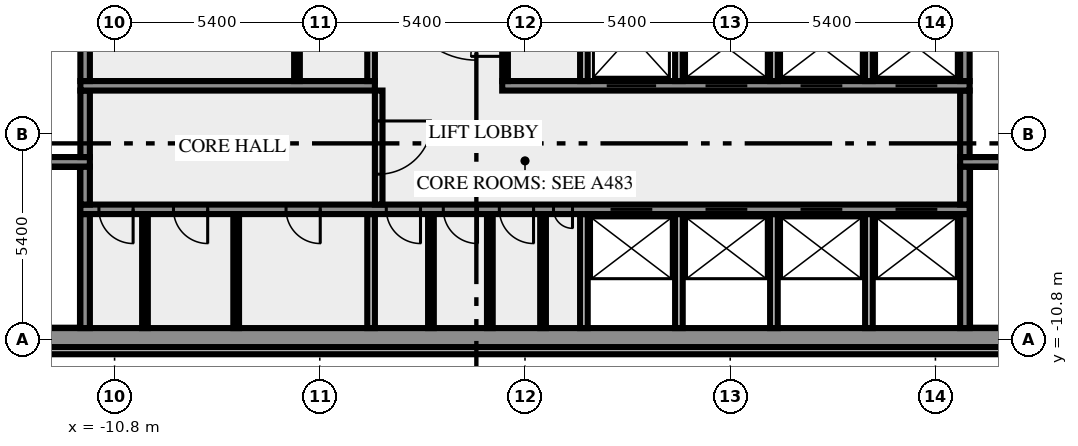
"""IFC4 building model, lengths in metres.
Left out: names, types, materials, properties, quantities, classifications, styles, units other than length and angle.
Written with IfcOpenShell. Run it as: python <this file> out.ifc"""

import sys

from ifc_helpers import new_model, si_unit, direction, frame, frame_2d, origin, place, context, subcontext, project, spatial, rectangle, extrude, element, fill, save


model = new_model("IFC4")
c1 = context("Model", 3, precision=1e-05, world=origin(), true_north=direction((0.0, 1.0)))
c2 = subcontext(c1, "Body", "Model", "MODEL_VIEW")
j1 = project(units=[si_unit("LENGTHUNIT", "METRE"), si_unit("PLANEANGLEUNIT", "RADIAN")], contexts=[c1])
p1 = place(None, origin())
s1 = spatial("IfcSite", under=j1, at=p1, CompositionType="ELEMENT")
p2 = place(p1, origin())
s2 = spatial("IfcBuilding", under=s1, at=p2, CompositionType="ELEMENT")
p3 = place(p2, frame((0.0, 0.0, 164.0)))
s3 = spatial("IfcBuildingStorey", under=s2, at=p3, CompositionType="ELEMENT", Elevation=164.0)
p4 = place(p3, frame((-17.444, -11.088, 0.0), z_axis=(0.0, 0.0, 1.0), x_axis=(1.0, 0.0, 0.0)))
e1 = element("IfcWall", 1, at=p4, inside=s3, PredefinedType="SOLIDWALL", context=c2, shape_type="SweptSolid", body=[
    extrude(rectangle(XDim=34.888, YDim=0.2, at=frame_2d((17.444, 0.0))), origin(), (0.0, 0.0, 1.0), 3.65),
])
p5 = place(p3, frame((-20.0, -10.75, 0.0), z_axis=(0.0, 0.0, 1.0), x_axis=(1.0, 0.0, 0.0)))
e2 = element("IfcWall", 2, at=p5, inside=s3, PredefinedType="SHEAR", context=c2, shape_type="SweptSolid", body=[
    extrude(rectangle(XDim=40.0, YDim=0.5, at=frame_2d((20.0, 0.0))), origin(), (0.0, 0.0, 1.0), 3.65),
])
p6 = place(p5, frame((0.8, 0.0, 1.0)))
e3 = element("IfcOpeningElement", 3, at=p6, cuts=e2, PredefinedType="OPENING", context=c2, shape_type="SweptSolid", body=[
    extrude(rectangle(XDim=1.2, YDim=1.2, at=frame_2d((0.6, 0.6))), frame((0.0, 0.26, 0.0), z_axis=(0.0, -1.0, 0.0), x_axis=(1.0, 0.0, 0.0)), (0.0, 0.0, 1.0), 0.52),
])
p7 = place(p5, frame((38.0, 0.0, 1.0)))
e4 = element("IfcOpeningElement", 4, at=p7, cuts=e2, PredefinedType="OPENING", context=c2, shape_type="SweptSolid", body=[
    extrude(rectangle(XDim=1.2, YDim=1.2, at=frame_2d((0.6, 0.6))), frame((0.0, 0.26, 0.0), z_axis=(0.0, -1.0, 0.0), x_axis=(1.0, 0.0, 0.0)), (0.0, 0.0, 1.0), 0.52),
])
p8 = place(p3, frame((-11.575, -10.5, 0.0), z_axis=(0.0, 0.0, 1.0), x_axis=(0.0, 1.0, 0.0)))
e5 = element("IfcWall", 5, at=p8, inside=s3, PredefinedType="SHEAR", context=c2, shape_type="SweptSolid", body=[
    extrude(rectangle(XDim=3.0, YDim=0.25, at=frame_2d((1.5, 0.0))), origin(), (0.0, 0.0, 1.0), 3.65),
])
for number, where, z_axis, x_axis in (
    (6, (-10.0, -10.5, 0.0), (0.0, 0.0, 1.0), (0.0, 1.0, 0.0)),
    (7, (-7.6, -10.5, 0.0), (0.0, 0.0, 1.0), (0.0, 1.0, 0.0)),
):
    element("IfcWall", number, at=place(p3, frame(where, z_axis=z_axis, x_axis=x_axis)), inside=s3, PredefinedType="PARTITIONING", context=c2, shape_type="SweptSolid", body=[
        extrude(rectangle(XDim=3.0, YDim=0.15, at=frame_2d((1.5, 0.0))), origin(), (0.0, 0.0, 1.0), 3.65),
    ])
p9 = place(p3, frame((-4.05, -10.5, 0.0), z_axis=(0.0, 0.0, 1.0), x_axis=(0.0, 1.0, 0.0)))
e8 = element("IfcWall", 8, at=p9, inside=s3, PredefinedType="SOLIDWALL", context=c2, shape_type="SweptSolid", body=[
    extrude(rectangle(XDim=3.0, YDim=0.2, at=frame_2d((1.5, 0.0))), origin(), (0.0, 0.0, 1.0), 3.65),
])
for number, where, z_axis, x_axis in (
    (9, (-2.475, -10.5, 0.0), (0.0, 0.0, 1.0), (0.0, 1.0, 0.0)),
    (10, (-0.925, -10.5, 0.0), (0.0, 0.0, 1.0), (0.0, 1.0, 0.0)),
    (11, (0.475, -10.5, 0.0), (0.0, 0.0, 1.0), (0.0, 1.0, 0.0)),
):
    element("IfcWall", number, at=place(p3, frame(where, z_axis=z_axis, x_axis=x_axis)), inside=s3, PredefinedType="PARTITIONING", context=c2, shape_type="SweptSolid", body=[
        extrude(rectangle(XDim=3.0, YDim=0.15, at=frame_2d((1.5, 0.0))), origin(), (0.0, 0.0, 1.0), 3.65),
    ])
for number, where, z_axis, x_axis in (
    (12, (1.55, -10.5, 0.0), (0.0, 0.0, 1.0), (0.0, 1.0, 0.0)),
    (13, (4.05, -10.5, 0.0), (0.0, 0.0, 1.0), (0.0, 1.0, 0.0)),
    (14, (6.55, -10.5, 0.0), (0.0, 0.0, 1.0), (0.0, 1.0, 0.0)),
    (15, (9.05, -10.5, 0.0), (0.0, 0.0, 1.0), (0.0, 1.0, 0.0)),
):
    element("IfcWall", number, at=place(p3, frame(where, z_axis=z_axis, x_axis=x_axis)), inside=s3, PredefinedType="SOLIDWALL", context=c2, shape_type="SweptSolid", body=[
        extrude(rectangle(XDim=3.0, YDim=0.2, at=frame_2d((1.5, 0.0))), origin(), (0.0, 0.0, 1.0), 3.65),
    ])
p10 = place(p3, frame((11.575, -10.5, 0.0), z_axis=(0.0, 0.0, 1.0), x_axis=(0.0, 1.0, 0.0)))
e16 = element("IfcWall", 16, at=p10, inside=s3, PredefinedType="SHEAR", context=c2, shape_type="SweptSolid", body=[
    extrude(rectangle(XDim=3.0, YDim=0.25, at=frame_2d((1.5, 0.0))), origin(), (0.0, 0.0, 1.0), 3.65),
])
p11 = place(p3, frame((11.7, -7.375, 0.0), z_axis=(0.0, 0.0, 1.0), x_axis=(-1.0, 0.0, 0.0)))
e17 = element("IfcWall", 17, at=p11, inside=s3, PredefinedType="SHEAR", context=c2, shape_type="SweptSolid", body=[
    extrude(rectangle(XDim=23.4, YDim=0.25, at=frame_2d((11.7, 0.0))), origin(), (0.0, 0.0, 1.0), 3.65),
])
p12 = place(p11, frame((22.012, 0.0, 0.0)))
e18 = element("IfcOpeningElement", 18, at=p12, cuts=e17, PredefinedType="OPENING", context=c2, shape_type="SweptSolid", body=[
    extrude(rectangle(XDim=0.9, YDim=2.1, at=frame_2d((0.45, 1.05))), frame((0.0, 0.135, 0.0), z_axis=(0.0, -1.0, 0.0), x_axis=(1.0, 0.0, 0.0)), (0.0, 0.0, 1.0), 0.27),
])
p13 = place(p11, frame((20.05, 0.0, 0.0)))
e19 = element("IfcOpeningElement", 19, at=p13, cuts=e17, PredefinedType="OPENING", context=c2, shape_type="SweptSolid", body=[
    extrude(rectangle(XDim=0.9, YDim=2.1, at=frame_2d((0.45, 1.05))), frame((0.0, 0.135, 0.0), z_axis=(0.0, -1.0, 0.0), x_axis=(1.0, 0.0, 0.0)), (0.0, 0.0, 1.0), 0.27),
])
p14 = place(p11, frame((17.088, 0.0, 0.0)))
e20 = element("IfcOpeningElement", 20, at=p14, cuts=e17, PredefinedType="OPENING", context=c2, shape_type="SweptSolid", body=[
    extrude(rectangle(XDim=0.9, YDim=2.1, at=frame_2d((0.45, 1.05))), frame((0.0, 0.135, 0.0), z_axis=(0.0, -1.0, 0.0), x_axis=(1.0, 0.0, 0.0)), (0.0, 0.0, 1.0), 0.27),
])
p15 = place(p11, frame((14.45, 0.0, 0.0)))
e21 = element("IfcOpeningElement", 21, at=p15, cuts=e17, PredefinedType="OPENING", context=c2, shape_type="SweptSolid", body=[
    extrude(rectangle(XDim=0.9, YDim=2.1, at=frame_2d((0.45, 1.05))), frame((0.0, 0.135, 0.0), z_axis=(0.0, -1.0, 0.0), x_axis=(1.0, 0.0, 0.0)), (0.0, 0.0, 1.0), 0.27),
])
p16 = place(p11, frame((12.95, 0.0, 0.0)))
e22 = element("IfcOpeningElement", 22, at=p16, cuts=e17, PredefinedType="OPENING", context=c2, shape_type="SweptSolid", body=[
    extrude(rectangle(XDim=0.9, YDim=2.1, at=frame_2d((0.45, 1.05))), frame((0.0, 0.135, 0.0), z_axis=(0.0, -1.0, 0.0), x_axis=(1.0, 0.0, 0.0)), (0.0, 0.0, 1.0), 0.27),
])
p17 = place(p11, frame((11.475, 0.0, 0.0)))
e23 = element("IfcOpeningElement", 23, at=p17, cuts=e17, PredefinedType="OPENING", context=c2, shape_type="SweptSolid", body=[
    extrude(rectangle(XDim=0.9, YDim=2.1, at=frame_2d((0.45, 1.05))), frame((0.0, 0.135, 0.0), z_axis=(0.0, -1.0, 0.0), x_axis=(1.0, 0.0, 0.0)), (0.0, 0.0, 1.0), 0.27),
])
p18 = place(p11, frame((10.45, 0.0, 0.0)))
e24 = element("IfcOpeningElement", 24, at=p18, cuts=e17, PredefinedType="OPENING", context=c2, shape_type="SweptSolid", body=[
    extrude(rectangle(XDim=0.5, YDim=2.1, at=frame_2d((0.25, 1.05))), frame((0.0, 0.135, 0.0), z_axis=(0.0, -1.0, 0.0), x_axis=(1.0, 0.0, 0.0)), (0.0, 0.0, 1.0), 0.27),
])
p19 = place(p11, frame((8.35, 0.0, 0.0)))
e25 = element("IfcOpeningElement", 25, at=p19, cuts=e17, PredefinedType="OPENING", context=c2, shape_type="SweptSolid", body=[
    extrude(rectangle(XDim=1.1, YDim=2.1, at=frame_2d((0.55, 1.05))), frame((0.0, 0.135, 0.0), z_axis=(0.0, -1.0, 0.0), x_axis=(1.0, 0.0, 0.0)), (0.0, 0.0, 1.0), 0.27),
])
p20 = place(p11, frame((5.85, 0.0, 0.0)))
e26 = element("IfcOpeningElement", 26, at=p20, cuts=e17, PredefinedType="OPENING", context=c2, shape_type="SweptSolid", body=[
    extrude(rectangle(XDim=1.1, YDim=2.1, at=frame_2d((0.55, 1.05))), frame((0.0, 0.135, 0.0), z_axis=(0.0, -1.0, 0.0), x_axis=(1.0, 0.0, 0.0)), (0.0, 0.0, 1.0), 0.27),
])
p21 = place(p11, frame((3.35, 0.0, 0.0)))
e27 = element("IfcOpeningElement", 27, at=p21, cuts=e17, PredefinedType="OPENING", context=c2, shape_type="SweptSolid", body=[
    extrude(rectangle(XDim=1.1, YDim=2.1, at=frame_2d((0.55, 1.05))), frame((0.0, 0.135, 0.0), z_axis=(0.0, -1.0, 0.0), x_axis=(1.0, 0.0, 0.0)), (0.0, 0.0, 1.0), 0.27),
])
p22 = place(p11, frame((0.85, 0.0, 0.0)))
e28 = element("IfcOpeningElement", 28, at=p22, cuts=e17, PredefinedType="OPENING", context=c2, shape_type="SweptSolid", body=[
    extrude(rectangle(XDim=1.1, YDim=2.1, at=frame_2d((0.55, 1.05))), frame((0.0, 0.135, 0.0), z_axis=(0.0, -1.0, 0.0), x_axis=(1.0, 0.0, 0.0)), (0.0, 0.0, 1.0), 0.27),
])
p23 = place(p3, frame((-11.575, -7.25, 0.0), z_axis=(0.0, 0.0, 1.0), x_axis=(0.0, 1.0, 0.0)))
e29 = element("IfcWall", 29, at=p23, inside=s3, PredefinedType="SHEAR", context=c2, shape_type="SweptSolid", body=[
    extrude(rectangle(XDim=1.0, YDim=0.25, at=frame_2d((0.5, 0.0))), origin(), (0.0, 0.0, 1.0), 3.65),
])
p24 = place(p3, frame((-3.85, -4.25, 0.0), z_axis=(0.0, 0.0, 1.0), x_axis=(0.0, -1.0, 0.0)))
e30 = element("IfcWall", 30, at=p24, inside=s3, PredefinedType="SOLIDWALL", context=c2, shape_type="SweptSolid", body=[
    extrude(rectangle(XDim=3.0, YDim=0.2, at=frame_2d((1.5, 0.0))), origin(), (0.0, 0.0, 1.0), 3.65),
])
p25 = place(p24, frame((0.8, 0.0, 0.0)))
e31 = element("IfcOpeningElement", 31, at=p25, cuts=e30, PredefinedType="OPENING", context=c2, shape_type="SweptSolid", body=[
    extrude(rectangle(XDim=1.4, YDim=2.1, at=frame_2d((0.7, 1.05))), frame((0.0, 0.11, 0.0), z_axis=(0.0, -1.0, 0.0), x_axis=(1.0, 0.0, 0.0)), (0.0, 0.0, 1.0), 0.22),
])
p26 = place(p3, frame((11.575, -7.25, 0.0), z_axis=(0.0, 0.0, 1.0), x_axis=(0.0, 1.0, 0.0)))
e32 = element("IfcWall", 32, at=p26, inside=s3, PredefinedType="SHEAR", context=c2, shape_type="SweptSolid", body=[
    extrude(rectangle(XDim=1.0, YDim=0.25, at=frame_2d((0.5, 0.0))), origin(), (0.0, 0.0, 1.0), 3.65),
])
p27 = place(p3, frame((-11.45, -6.125, 0.0), z_axis=(0.0, 0.0, 1.0), x_axis=(-1.0, 0.0, 0.0)))
e33 = element("IfcWall", 33, at=p27, inside=s3, PredefinedType="SHEAR", context=c2, shape_type="SweptSolid", body=[
    extrude(rectangle(XDim=8.05, YDim=0.25, at=frame_2d((4.025, 0.0))), origin(), (0.0, 0.0, 1.0), 3.65),
])
p28 = place(p27, frame((6.2, 0.0, 0.0)))
e34 = element("IfcOpeningElement", 34, at=p28, cuts=e33, PredefinedType="OPENING", context=c2, shape_type="SweptSolid", body=[
    extrude(rectangle(XDim=1.8, YDim=2.1, at=frame_2d((0.9, 1.05))), frame((0.0, 0.135, 0.0), z_axis=(0.0, -1.0, 0.0), x_axis=(1.0, 0.0, 0.0)), (0.0, 0.0, 1.0), 0.27),
])
p29 = place(p3, frame((19.5, -6.125, 0.0), z_axis=(0.0, 0.0, 1.0), x_axis=(-1.0, 0.0, 0.0)))
e35 = element("IfcWall", 35, at=p29, inside=s3, PredefinedType="SHEAR", context=c2, shape_type="SweptSolid", body=[
    extrude(rectangle(XDim=8.05, YDim=0.25, at=frame_2d((4.025, 0.0))), origin(), (0.0, 0.0, 1.0), 3.65),
])
p30 = place(p29, frame((0.05, 0.0, 0.0)))
e36 = element("IfcOpeningElement", 36, at=p30, cuts=e35, PredefinedType="OPENING", context=c2, shape_type="SweptSolid", body=[
    extrude(rectangle(XDim=1.8, YDim=2.1, at=frame_2d((0.9, 1.05))), frame((0.0, 0.135, 0.0), z_axis=(0.0, -1.0, 0.0), x_axis=(1.0, 0.0, 0.0)), (0.0, 0.0, 1.0), 0.27),
])
for number, where, z_axis, x_axis in (
    (37, (-11.575, -6.0, 0.0), (0.0, 0.0, 1.0), (0.0, 1.0, 0.0)),
    (38, (11.575, -6.0, 0.0), (0.0, 0.0, 1.0), (0.0, 1.0, 0.0)),
):
    element("IfcWall", number, at=place(p3, frame(where, z_axis=z_axis, x_axis=x_axis)), inside=s3, PredefinedType="SHEAR", context=c2, shape_type="SweptSolid", body=[
        extrude(rectangle(XDim=1.75, YDim=0.25, at=frame_2d((0.875, 0.0))), origin(), (0.0, 0.0, 1.0), 3.65),
    ])
p31 = place(p3, frame((-11.7, -4.125, 0.0), z_axis=(0.0, 0.0, 1.0), x_axis=(1.0, 0.0, 0.0)))
e39 = element("IfcWall", 39, at=p31, inside=s3, PredefinedType="SHEAR", context=c2, shape_type="SweptSolid", body=[
    extrude(rectangle(XDim=7.75, YDim=0.25, at=frame_2d((3.875, 0.0))), origin(), (0.0, 0.0, 1.0), 3.65),
])
p32 = place(p3, frame((-0.6, -4.125, 0.0), z_axis=(0.0, 0.0, 1.0), x_axis=(1.0, 0.0, 0.0)))
e40 = element("IfcWall", 40, at=p32, inside=s3, PredefinedType="SHEAR", context=c2, shape_type="SweptSolid", body=[
    extrude(rectangle(XDim=12.3, YDim=0.25, at=frame_2d((6.15, 0.0))), origin(), (0.0, 0.0, 1.0), 3.65),
])
p33 = place(p32, frame((2.75, 0.0, 0.0)))
e41 = element("IfcOpeningElement", 41, at=p33, cuts=e40, PredefinedType="OPENING", context=c2, shape_type="SweptSolid", body=[
    extrude(rectangle(XDim=1.3, YDim=2.1, at=frame_2d((0.65, 1.05))), frame((0.0, 0.135, 0.0), z_axis=(0.0, -1.0, 0.0), x_axis=(1.0, 0.0, 0.0)), (0.0, 0.0, 1.0), 0.27),
])
p34 = place(p32, frame((5.35, 0.0, 0.0)))
e42 = element("IfcOpeningElement", 42, at=p34, cuts=e40, PredefinedType="OPENING", context=c2, shape_type="SweptSolid", body=[
    extrude(rectangle(XDim=1.1, YDim=2.1, at=frame_2d((0.55, 1.05))), frame((0.0, 0.135, 0.0), z_axis=(0.0, -1.0, 0.0), x_axis=(1.0, 0.0, 0.0)), (0.0, 0.0, 1.0), 0.27),
])
p35 = place(p32, frame((7.85, 0.0, 0.0)))
e43 = element("IfcOpeningElement", 43, at=p35, cuts=e40, PredefinedType="OPENING", context=c2, shape_type="SweptSolid", body=[
    extrude(rectangle(XDim=1.1, YDim=2.1, at=frame_2d((0.55, 1.05))), frame((0.0, 0.135, 0.0), z_axis=(0.0, -1.0, 0.0), x_axis=(1.0, 0.0, 0.0)), (0.0, 0.0, 1.0), 0.27),
])
p36 = place(p32, frame((10.35, 0.0, 0.0)))
e44 = element("IfcOpeningElement", 44, at=p36, cuts=e40, PredefinedType="OPENING", context=c2, shape_type="SweptSolid", body=[
    extrude(rectangle(XDim=1.1, YDim=2.1, at=frame_2d((0.55, 1.05))), frame((0.0, 0.135, 0.0), z_axis=(0.0, -1.0, 0.0), x_axis=(1.0, 0.0, 0.0)), (0.0, 0.0, 1.0), 0.27),
])
p37 = place(p3, frame((-11.575, -4.0, 0.0), z_axis=(0.0, 0.0, 1.0), x_axis=(0.0, 1.0, 0.0)))
e45 = element("IfcWall", 45, at=p37, inside=s3, PredefinedType="SHEAR", context=c2, shape_type="SweptSolid", body=[
    extrude(rectangle(XDim=2.3, YDim=0.25, at=frame_2d((1.15, 0.0))), origin(), (0.0, 0.0, 1.0), 3.65),
])
p38 = place(p3, frame((-6.0, -4.0, 0.0), z_axis=(0.0, 0.0, 1.0), x_axis=(0.0, 1.0, 0.0)))
e46 = element("IfcWall", 46, at=p38, inside=s3, PredefinedType="PARTITIONING", context=c2, shape_type="SweptSolid", body=[
    extrude(rectangle(XDim=2.3, YDim=0.15, at=frame_2d((1.15, 0.0))), origin(), (0.0, 0.0, 1.0), 3.65),
])
p39 = place(p3, frame((-4.05, -4.0, 0.0), z_axis=(0.0, 0.0, 1.0), x_axis=(0.0, 1.0, 0.0)))
e47 = element("IfcWall", 47, at=p39, inside=s3, PredefinedType="SOLIDWALL", context=c2, shape_type="SweptSolid", body=[
    extrude(rectangle(XDim=2.3, YDim=0.2, at=frame_2d((1.15, 0.0))), origin(), (0.0, 0.0, 1.0), 3.65),
])
p40 = place(p3, frame((-0.525, -4.0, 0.0), z_axis=(0.0, 0.0, 1.0), x_axis=(0.0, 1.0, 0.0)))
e48 = element("IfcWall", 48, at=p40, inside=s3, PredefinedType="PARTITIONING", context=c2, shape_type="SweptSolid", body=[
    extrude(rectangle(XDim=2.3, YDim=0.15, at=frame_2d((1.15, 0.0))), origin(), (0.0, 0.0, 1.0), 3.65),
])
p41 = place(p40, frame((0.65, 0.0, 0.0)))
e49 = element("IfcOpeningElement", 49, at=p41, cuts=e48, PredefinedType="OPENING", context=c2, shape_type="SweptSolid", body=[
    extrude(rectangle(XDim=0.9, YDim=2.1, at=frame_2d((0.45, 1.05))), frame((0.0, 0.085, 0.0), z_axis=(0.0, -1.0, 0.0), x_axis=(1.0, 0.0, 0.0)), (0.0, 0.0, 1.0), 0.17),
])
for number, where, z_axis, x_axis in (
    (50, (1.55, -4.0, 0.0), (0.0, 0.0, 1.0), (0.0, 1.0, 0.0)),
    (51, (4.05, -4.0, 0.0), (0.0, 0.0, 1.0), (0.0, 1.0, 0.0)),
    (52, (6.55, -4.0, 0.0), (0.0, 0.0, 1.0), (0.0, 1.0, 0.0)),
    (53, (9.05, -4.0, 0.0), (0.0, 0.0, 1.0), (0.0, 1.0, 0.0)),
):
    element("IfcWall", number, at=place(p3, frame(where, z_axis=z_axis, x_axis=x_axis)), inside=s3, PredefinedType="SOLIDWALL", context=c2, shape_type="SweptSolid", body=[
        extrude(rectangle(XDim=2.3, YDim=0.2, at=frame_2d((1.15, 0.0))), origin(), (0.0, 0.0, 1.0), 3.65),
    ])
p42 = place(p3, frame((11.575, -4.0, 0.0), z_axis=(0.0, 0.0, 1.0), x_axis=(0.0, 1.0, 0.0)))
e54 = element("IfcWall", 54, at=p42, inside=s3, PredefinedType="SHEAR", context=c2, shape_type="SweptSolid", body=[
    extrude(rectangle(XDim=2.3, YDim=0.25, at=frame_2d((1.15, 0.0))), origin(), (0.0, 0.0, 1.0), 3.65),
])
p43 = place(p12, origin())
e55 = element("IfcDoor", 55, at=p43, inside=s3, OperationType="SINGLE_SWING_RIGHT", PredefinedType="DOOR", context=c2, shape_type="SweptSolid", body=[
    extrude(rectangle(XDim=0.9, YDim=2.1, at=frame_2d((0.45, 1.05))), frame((0.0, 0.025, 0.0), z_axis=(0.0, -1.0, 0.0), x_axis=(1.0, 0.0, 0.0)), (0.0, 0.0, 1.0), 0.05),
])
fill(e18, e55)
p44 = place(p13, origin())
e56 = element("IfcDoor", 56, at=p44, inside=s3, OperationType="SINGLE_SWING_RIGHT", PredefinedType="DOOR", context=c2, shape_type="SweptSolid", body=[
    extrude(rectangle(XDim=0.9, YDim=2.1, at=frame_2d((0.45, 1.05))), frame((0.0, 0.025, 0.0), z_axis=(0.0, -1.0, 0.0), x_axis=(1.0, 0.0, 0.0)), (0.0, 0.0, 1.0), 0.05),
])
fill(e19, e56)
p45 = place(p14, origin())
e57 = element("IfcDoor", 57, at=p45, inside=s3, OperationType="SINGLE_SWING_RIGHT", PredefinedType="DOOR", context=c2, shape_type="SweptSolid", body=[
    extrude(rectangle(XDim=0.9, YDim=2.1, at=frame_2d((0.45, 1.05))), frame((0.0, 0.025, 0.0), z_axis=(0.0, -1.0, 0.0), x_axis=(1.0, 0.0, 0.0)), (0.0, 0.0, 1.0), 0.05),
])
fill(e20, e57)
p46 = place(p15, origin())
e58 = element("IfcDoor", 58, at=p46, inside=s3, OperationType="SINGLE_SWING_RIGHT", PredefinedType="DOOR", context=c2, shape_type="SweptSolid", body=[
    extrude(rectangle(XDim=0.9, YDim=2.1, at=frame_2d((0.45, 1.05))), frame((0.0, 0.025, 0.0), z_axis=(0.0, -1.0, 0.0), x_axis=(1.0, 0.0, 0.0)), (0.0, 0.0, 1.0), 0.05),
])
fill(e21, e58)
p47 = place(p16, origin())
e59 = element("IfcDoor", 59, at=p47, inside=s3, OperationType="SINGLE_SWING_RIGHT", PredefinedType="DOOR", context=c2, shape_type="SweptSolid", body=[
    extrude(rectangle(XDim=0.9, YDim=2.1, at=frame_2d((0.45, 1.05))), frame((0.0, 0.025, 0.0), z_axis=(0.0, -1.0, 0.0), x_axis=(1.0, 0.0, 0.0)), (0.0, 0.0, 1.0), 0.05),
])
fill(e22, e59)
p48 = place(p17, origin())
e60 = element("IfcDoor", 60, at=p48, inside=s3, OperationType="SINGLE_SWING_RIGHT", PredefinedType="DOOR", context=c2, shape_type="SweptSolid", body=[
    extrude(rectangle(XDim=0.9, YDim=2.1, at=frame_2d((0.45, 1.05))), frame((0.0, 0.025, 0.0), z_axis=(0.0, -1.0, 0.0), x_axis=(1.0, 0.0, 0.0)), (0.0, 0.0, 1.0), 0.05),
])
fill(e23, e60)
p49 = place(p18, origin())
e61 = element("IfcDoor", 61, at=p49, inside=s3, OperationType="SINGLE_SWING_LEFT", PredefinedType="DOOR", context=c2, shape_type="SweptSolid", body=[
    extrude(rectangle(XDim=0.5, YDim=2.1, at=frame_2d((0.25, 1.05))), frame((0.0, 0.025, 0.0), z_axis=(0.0, -1.0, 0.0), x_axis=(1.0, 0.0, 0.0)), (0.0, 0.0, 1.0), 0.05),
])
fill(e24, e61)
p50 = place(p19, origin())
e62 = element("IfcDoor", 62, at=p50, inside=s3, OperationType="DOUBLE_DOOR_SLIDING", PredefinedType="DOOR", context=c2, shape_type="SweptSolid", body=[
    extrude(rectangle(XDim=1.1, YDim=2.1, at=frame_2d((0.55, 1.05))), frame((0.0, 0.025, 0.0), z_axis=(0.0, -1.0, 0.0), x_axis=(1.0, 0.0, 0.0)), (0.0, 0.0, 1.0), 0.05),
])
fill(e25, e62)
p51 = place(p20, origin())
e63 = element("IfcDoor", 63, at=p51, inside=s3, OperationType="DOUBLE_DOOR_SLIDING", PredefinedType="DOOR", context=c2, shape_type="SweptSolid", body=[
    extrude(rectangle(XDim=1.1, YDim=2.1, at=frame_2d((0.55, 1.05))), frame((0.0, 0.025, 0.0), z_axis=(0.0, -1.0, 0.0), x_axis=(1.0, 0.0, 0.0)), (0.0, 0.0, 1.0), 0.05),
])
fill(e26, e63)
p52 = place(p21, origin())
e64 = element("IfcDoor", 64, at=p52, inside=s3, OperationType="DOUBLE_DOOR_SLIDING", PredefinedType="DOOR", context=c2, shape_type="SweptSolid", body=[
    extrude(rectangle(XDim=1.1, YDim=2.1, at=frame_2d((0.55, 1.05))), frame((0.0, 0.025, 0.0), z_axis=(0.0, -1.0, 0.0), x_axis=(1.0, 0.0, 0.0)), (0.0, 0.0, 1.0), 0.05),
])
fill(e27, e64)
p53 = place(p22, origin())
e65 = element("IfcDoor", 65, at=p53, inside=s3, OperationType="DOUBLE_DOOR_SLIDING", PredefinedType="DOOR", context=c2, shape_type="SweptSolid", body=[
    extrude(rectangle(XDim=1.1, YDim=2.1, at=frame_2d((0.55, 1.05))), frame((0.0, 0.025, 0.0), z_axis=(0.0, -1.0, 0.0), x_axis=(1.0, 0.0, 0.0)), (0.0, 0.0, 1.0), 0.05),
])
fill(e28, e65)
p54 = place(p25, origin())
e66 = element("IfcDoor", 66, at=p54, inside=s3, OperationType="DOUBLE_DOOR_SINGLE_SWING", PredefinedType="DOOR", context=c2, shape_type="SweptSolid", body=[
    extrude(rectangle(XDim=1.4, YDim=2.1, at=frame_2d((0.7, 1.05))), frame((0.0, 0.025, 0.0), z_axis=(0.0, -1.0, 0.0), x_axis=(1.0, 0.0, 0.0)), (0.0, 0.0, 1.0), 0.05),
])
fill(e31, e66)
p55 = place(p33, origin())
e67 = element("IfcDoor", 67, at=p55, inside=s3, OperationType="DOUBLE_DOOR_SLIDING", PredefinedType="DOOR", context=c2, shape_type="SweptSolid", body=[
    extrude(rectangle(XDim=1.3, YDim=2.1, at=frame_2d((0.65, 1.05))), frame((0.0, 0.025, 0.0), z_axis=(0.0, -1.0, 0.0), x_axis=(1.0, 0.0, 0.0)), (0.0, 0.0, 1.0), 0.05),
])
fill(e41, e67)
p56 = place(p34, origin())
e68 = element("IfcDoor", 68, at=p56, inside=s3, OperationType="DOUBLE_DOOR_SLIDING", PredefinedType="DOOR", context=c2, shape_type="SweptSolid", body=[
    extrude(rectangle(XDim=1.1, YDim=2.1, at=frame_2d((0.55, 1.05))), frame((0.0, 0.025, 0.0), z_axis=(0.0, -1.0, 0.0), x_axis=(1.0, 0.0, 0.0)), (0.0, 0.0, 1.0), 0.05),
])
fill(e42, e68)
p57 = place(p35, origin())
e69 = element("IfcDoor", 69, at=p57, inside=s3, OperationType="DOUBLE_DOOR_SLIDING", PredefinedType="DOOR", context=c2, shape_type="SweptSolid", body=[
    extrude(rectangle(XDim=1.1, YDim=2.1, at=frame_2d((0.55, 1.05))), frame((0.0, 0.025, 0.0), z_axis=(0.0, -1.0, 0.0), x_axis=(1.0, 0.0, 0.0)), (0.0, 0.0, 1.0), 0.05),
])
fill(e43, e69)
p58 = place(p36, origin())
e70 = element("IfcDoor", 70, at=p58, inside=s3, OperationType="DOUBLE_DOOR_SLIDING", PredefinedType="DOOR", context=c2, shape_type="SweptSolid", body=[
    extrude(rectangle(XDim=1.1, YDim=2.1, at=frame_2d((0.55, 1.05))), frame((0.0, 0.025, 0.0), z_axis=(0.0, -1.0, 0.0), x_axis=(1.0, 0.0, 0.0)), (0.0, 0.0, 1.0), 0.05),
])
fill(e44, e70)
p59 = place(p41, origin())
e71 = element("IfcDoor", 71, at=p59, inside=s3, OperationType="SINGLE_SWING_LEFT", PredefinedType="DOOR", context=c2, shape_type="SweptSolid", body=[
    extrude(rectangle(XDim=0.9, YDim=2.1, at=frame_2d((0.45, 1.05))), frame((0.0, 0.025, 0.0), z_axis=(0.0, -1.0, 0.0), x_axis=(1.0, 0.0, 0.0)), (0.0, 0.0, 1.0), 0.05),
])
fill(e49, e71)
save(model, sys.argv[1])
